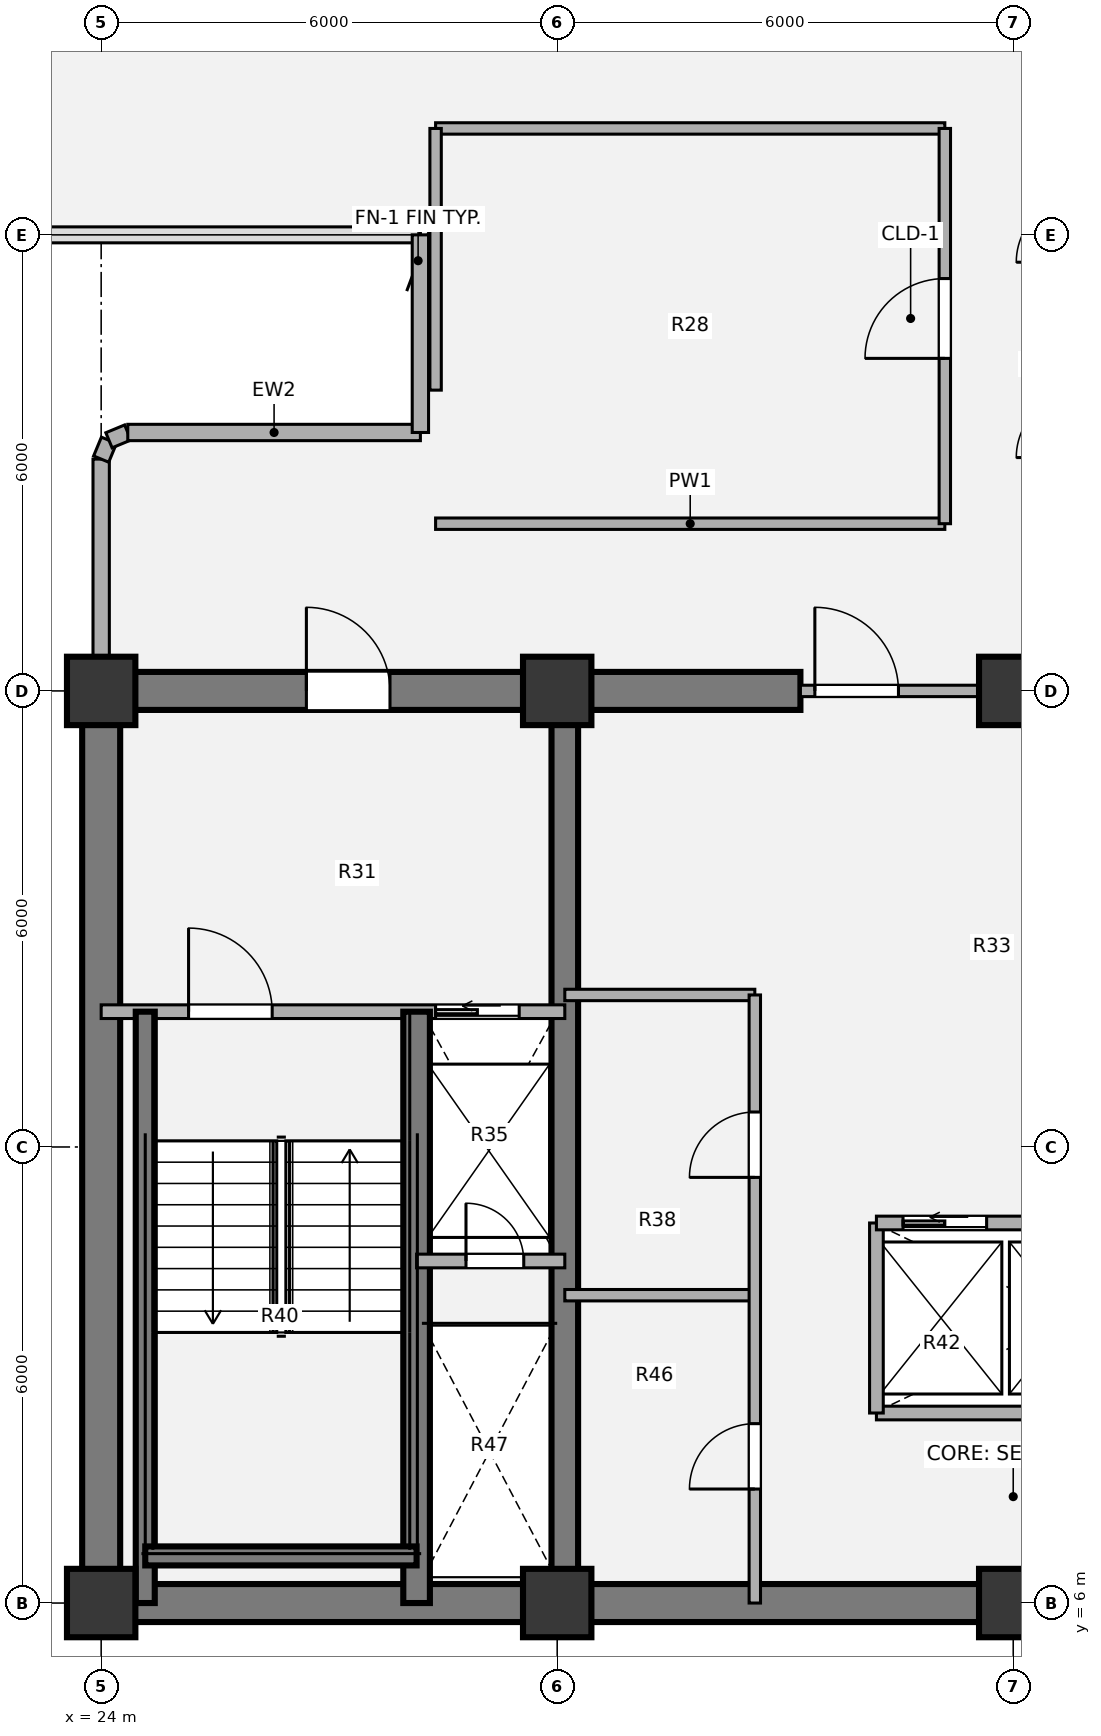
"""IFC4 building model, lengths in metres.
Left out: names, types, materials, properties, quantities, classifications, styles, units other than length and angle.
Written with IfcOpenShell. Run it as: python <this file> out.ifc"""

import sys

from ifc_helpers import new_model, si_unit, direction, frame, frame_2d, origin, origin_2d, place, context, subcontext, project, spatial, rectangle, extrude, source, transform, mapped, element, fill, save


model = new_model("IFC4")
c1 = context("Model", 3, precision=1e-05, world=origin(), true_north=direction((0.0, 1.0)))
c2 = subcontext(c1, "Body", "Model", "MODEL_VIEW")
j1 = project(units=[si_unit("LENGTHUNIT", "METRE"), si_unit("PLANEANGLEUNIT", "RADIAN")], contexts=[c1])
p1 = place(None, origin())
s1 = spatial("IfcSite", under=j1, at=p1, CompositionType="ELEMENT")
p2 = place(p1, origin())
s2 = spatial("IfcBuilding", under=s1, at=p2, CompositionType="ELEMENT")
p3 = place(p2, frame((0.0, 0.0, 135.18)))
s3 = spatial("IfcBuildingStorey", under=s2, at=p3, CompositionType="ELEMENT", Elevation=135.18)
m1 = source(origin(), c2, "Body", "SweptSolid", [
    extrude(rectangle(XDim=0.9, YDim=0.9, at=origin_2d()), origin(), (0.0, 0.0, 1.0), 3.78),
])
for number, where, z_axis, x_axis in (
    (1, (24.0, 6.0, 0.0), (0.0, 0.0, 1.0), (1.0, 0.0, 0.0)),
    (2, (30.0, 6.0, 0.0), (0.0, 0.0, 1.0), (1.0, 0.0, 0.0)),
    (3, (36.0, 6.0, 0.0), (0.0, 0.0, 1.0), (1.0, 0.0, 0.0)),
    (4, (24.0, 18.0, 0.0), (0.0, 0.0, 1.0), (1.0, 0.0, 0.0)),
    (5, (30.0, 18.0, 0.0), (0.0, 0.0, 1.0), (1.0, 0.0, 0.0)),
    (6, (36.0, 18.0, 0.0), (0.0, 0.0, 1.0), (1.0, 0.0, 0.0)),
):
    element("IfcColumn", number, at=place(p3, frame(where, z_axis=z_axis, x_axis=x_axis)), inside=s3, PredefinedType="COLUMN", context=c2, shape_type="MappedRepresentation", body=[
        mapped(m1, transform((0.0, 0.0, 0.0), x_axis=(1.0, 0.0, 0.0), y_axis=(0.0, 1.0, 0.0), z_axis=(0.0, 0.0, 1.0), scale=1.0)),
    ])
p4 = place(p3, frame((48.25, 6.0, 0.0), z_axis=(0.0, 0.0, 1.0), x_axis=(-1.0, 0.0, 0.0)))
e7 = element("IfcWall", 7, at=p4, inside=s3, PredefinedType="SHEAR", context=c2, shape_type="SweptSolid", body=[
    extrude(rectangle(XDim=24.5, YDim=0.5, at=frame_2d((12.25, 0.0))), origin(), (0.0, 0.0, 1.0), 3.78),
])
p5 = place(p3, frame((24.0, 6.0, 0.0), z_axis=(0.0, 0.0, 1.0), x_axis=(0.0, 1.0, 0.0)))
e8 = element("IfcWall", 8, at=p5, inside=s3, PredefinedType="SHEAR", context=c2, shape_type="SweptSolid", body=[
    extrude(rectangle(XDim=12.0, YDim=0.5, at=frame_2d((6.0, 0.0))), origin(), (0.0, 0.0, 1.0), 3.78),
])
p6 = place(p3, frame((23.75, 18.0, 0.0), z_axis=(0.0, 0.0, 1.0), x_axis=(1.0, 0.0, 0.0)))
e9 = element("IfcWall", 9, at=p6, inside=s3, PredefinedType="SHEAR", context=c2, shape_type="SweptSolid", body=[
    extrude(rectangle(XDim=9.45, YDim=0.5, at=frame_2d((4.725, 0.0))), origin(), (0.0, 0.0, 1.0), 3.78),
])
p7 = place(p6, frame((2.95, 0.0, 0.0)))
e10 = element("IfcOpeningElement", 10, at=p7, cuts=e9, PredefinedType="OPENING", context=c2, shape_type="SweptSolid", body=[
    extrude(rectangle(XDim=1.1, YDim=2.1, at=origin_2d()), frame((0.55, 0.26, 1.05), z_axis=(0.0, -1.0, 0.0), x_axis=(1.0, 0.0, 0.0)), (0.0, 0.0, 1.0), 0.52),
])
p8 = place(p3, frame((30.1, 6.0, 0.0), z_axis=(0.0, 0.0, 1.0), x_axis=(0.0, 1.0, 0.0)))
e11 = element("IfcWall", 11, at=p8, inside=s3, PredefinedType="SHEAR", context=c2, shape_type="SweptSolid", body=[
    extrude(rectangle(XDim=12.0, YDim=0.35, at=frame_2d((6.0, 0.0))), origin(), (0.0, 0.0, 1.0), 3.78),
])
p9 = place(p3, frame((24.0, 18.43, 0.0), z_axis=(0.0, 0.0, 1.0), x_axis=(0.0, 1.0, 0.0)))
e12 = element("IfcWall", 12, at=p9, inside=s3, PredefinedType="SOLIDWALL", context=c2, shape_type="SweptSolid", body=[
    extrude(rectangle(XDim=2.62, YDim=0.215, at=frame_2d((1.31, 0.0))), origin(), (0.0, 0.0, 1.0), 3.53),
])
p10 = place(p3, frame((24.0, 21.05, 0.0), z_axis=(0.0, 0.0, 1.0), x_axis=(0.382673670509, 0.923883575944, 0.0)))
e13 = element("IfcWall", 13, at=p10, inside=s3, PredefinedType="SOLIDWALL", context=c2, shape_type="SweptSolid", body=[
    extrude(rectangle(XDim=0.268, YDim=0.215, at=frame_2d((0.134, 0.0))), origin(), (0.0, 0.0, 1.0), 3.53),
])
p11 = place(p3, frame((24.103, 21.298, 0.0), z_axis=(0.0, 0.0, 1.0), x_axis=(0.924205486139, 0.381895560841, 0.0)))
e14 = element("IfcWall", 14, at=p11, inside=s3, PredefinedType="SOLIDWALL", context=c2, shape_type="SweptSolid", body=[
    extrude(rectangle(XDim=0.268, YDim=0.215, at=frame_2d((0.134, 0.0))), origin(), (0.0, 0.0, 1.0), 3.53),
])
p12 = place(p3, frame((24.35, 21.4, 0.0), z_axis=(0.0, 0.0, 1.0), x_axis=(1.0, 0.0, 0.0)))
e15 = element("IfcWall", 15, at=p12, inside=s3, PredefinedType="SOLIDWALL", context=c2, shape_type="SweptSolid", body=[
    extrude(rectangle(XDim=3.85, YDim=0.215, at=frame_2d((1.925, 0.0))), origin(), (0.0, 0.0, 1.0), 3.53),
])
p13 = place(p3, frame((28.2, 21.4, 0.0), z_axis=(0.0, 0.0, 1.0), x_axis=(0.0, 1.0, 0.0)))
e16 = element("IfcWall", 16, at=p13, inside=s3, PredefinedType="SOLIDWALL", context=c2, shape_type="SweptSolid", body=[
    extrude(rectangle(XDim=2.6, YDim=0.215, at=frame_2d((1.3, 0.0))), origin(), (0.0, 0.0, 1.0), 3.53),
])
p14 = place(p3, frame((30.1, 14.0, 0.0), z_axis=(0.0, 0.0, 1.0), x_axis=(1.0, 0.0, 0.0)))
e17 = element("IfcWall", 17, at=p14, inside=s3, PredefinedType="PARTITIONING", context=c2, shape_type="SweptSolid", body=[
    extrude(rectangle(XDim=2.5, YDim=0.15, at=frame_2d((1.25, 0.0))), origin(), (0.0, 0.0, 1.0), 3.5),
])
p15 = place(p3, frame((34.2, 8.5, 0.0), z_axis=(0.0, 0.0, 1.0), x_axis=(1.0, 0.0, 0.0)))
e18 = element("IfcWall", 18, at=p15, inside=s3, PredefinedType="PARTITIONING", context=c2, shape_type="SweptSolid", body=[
    extrude(rectangle(XDim=5.15, YDim=0.18, at=frame_2d((2.575, 0.0))), origin(), (0.0, 0.0, 1.0), 3.5),
])
p16 = place(p3, frame((34.2, 8.5, 0.0), z_axis=(0.0, 0.0, 1.0), x_axis=(0.0, 1.0, 0.0)))
e19 = element("IfcWall", 19, at=p16, inside=s3, PredefinedType="PARTITIONING", context=c2, shape_type="SweptSolid", body=[
    extrude(rectangle(XDim=2.5, YDim=0.18, at=frame_2d((1.25, 0.0))), origin(), (0.0, 0.0, 1.0), 3.5),
])
p17 = place(p3, frame((30.1, 10.05, 0.0), z_axis=(0.0, 0.0, 1.0), x_axis=(1.0, 0.0, 0.0)))
e20 = element("IfcWall", 20, at=p17, inside=s3, PredefinedType="PARTITIONING", context=c2, shape_type="SweptSolid", body=[
    extrude(rectangle(XDim=2.5, YDim=0.15, at=frame_2d((1.25, 0.0))), origin(), (0.0, 0.0, 1.0), 3.5),
])
p18 = place(p3, frame((32.6, 6.0, 0.0), z_axis=(0.0, 0.0, 1.0), x_axis=(0.0, 1.0, 0.0)))
e21 = element("IfcWall", 21, at=p18, inside=s3, PredefinedType="PARTITIONING", context=c2, shape_type="SweptSolid", body=[
    extrude(rectangle(XDim=8.0, YDim=0.15, at=frame_2d((4.0, 0.0))), origin(), (0.0, 0.0, 1.0), 3.5),
])
p19 = place(p18, frame((1.5, 0.0, 0.0)))
e22 = element("IfcOpeningElement", 22, at=p19, cuts=e21, PredefinedType="OPENING", context=c2, shape_type="SweptSolid", body=[
    extrude(rectangle(XDim=0.86, YDim=2.1, at=origin_2d()), frame((0.43, 0.085, 1.05), z_axis=(0.0, -1.0, 0.0), x_axis=(1.0, 0.0, 0.0)), (0.0, 0.0, 1.0), 0.17),
])
p20 = place(p18, frame((5.6, 0.0, 0.0)))
e23 = element("IfcOpeningElement", 23, at=p20, cuts=e21, PredefinedType="OPENING", context=c2, shape_type="SweptSolid", body=[
    extrude(rectangle(XDim=0.86, YDim=2.1, at=origin_2d()), frame((0.43, 0.085, 1.05), z_axis=(0.0, -1.0, 0.0), x_axis=(1.0, 0.0, 0.0)), (0.0, 0.0, 1.0), 0.17),
])
p21 = place(p3, frame((33.2, 18.0, 0.0), z_axis=(0.0, 0.0, 1.0), x_axis=(1.0, 0.0, 0.0)))
e24 = element("IfcWall", 24, at=p21, inside=s3, PredefinedType="PARTITIONING", context=c2, shape_type="SweptSolid", body=[
    extrude(rectangle(XDim=5.6, YDim=0.15, at=frame_2d((2.8, 0.0))), origin(), (0.0, 0.0, 1.0), 2.315),
])
p22 = place(p21, frame((0.19, 0.0, 0.0)))
e25 = element("IfcOpeningElement", 25, at=p22, cuts=e24, PredefinedType="OPENING", context=c2, shape_type="SweptSolid", body=[
    extrude(rectangle(XDim=1.1, YDim=2.1, at=origin_2d()), frame((0.55, 0.085, 1.05), z_axis=(0.0, -1.0, 0.0), x_axis=(1.0, 0.0, 0.0)), (0.0, 0.0, 1.0), 0.17),
])
p23 = place(p21, frame((4.31, 0.0, 0.0)))
e26 = element("IfcOpeningElement", 26, at=p23, cuts=e24, PredefinedType="OPENING", context=c2, shape_type="SweptSolid", body=[
    extrude(rectangle(XDim=1.1, YDim=2.1, at=origin_2d()), frame((0.55, 0.085, 1.05), z_axis=(0.0, -1.0, 0.0), x_axis=(1.0, 0.0, 0.0)), (0.0, 0.0, 1.0), 0.17),
])
p24 = place(p3, frame((24.0, 13.78, 0.0), z_axis=(0.0, 0.0, 1.0), x_axis=(1.0, 0.0, 0.0)))
e27 = element("IfcWall", 27, at=p24, inside=s3, PredefinedType="PARTITIONING", context=c2, shape_type="SweptSolid", body=[
    extrude(rectangle(XDim=6.1, YDim=0.18, at=frame_2d((3.05, 0.0))), origin(), (0.0, 0.0, 1.0), 3.5),
])
p25 = place(p24, frame((1.15, 0.0, 0.0)))
e28 = element("IfcOpeningElement", 28, at=p25, cuts=e27, PredefinedType="OPENING", context=c2, shape_type="SweptSolid", body=[
    extrude(rectangle(XDim=1.1, YDim=2.1, at=origin_2d()), frame((0.55, 0.1, 1.05), z_axis=(0.0, -1.0, 0.0), x_axis=(1.0, 0.0, 0.0)), (0.0, 0.0, 1.0), 0.2),
])
p26 = place(p24, frame((4.4, 0.0, 0.0)))
e29 = element("IfcOpeningElement", 29, at=p26, cuts=e27, PredefinedType="OPENING", context=c2, shape_type="SweptSolid", body=[
    extrude(rectangle(XDim=1.1, YDim=2.1, at=origin_2d()), frame((0.55, 0.1, 1.05), z_axis=(0.0, -1.0, 0.0), x_axis=(1.0, 0.0, 0.0)), (0.0, 0.0, 1.0), 0.2),
])
p27 = place(p3, frame((28.15, 6.0, 0.0), z_axis=(0.0, 0.0, 1.0), x_axis=(0.0, 1.0, 0.0)))
e30 = element("IfcWall", 30, at=p27, inside=s3, PredefinedType="SHEAR", context=c2, shape_type="SweptSolid", body=[
    extrude(rectangle(XDim=7.78, YDim=0.35, at=frame_2d((3.89, 0.0))), origin(), (0.0, 0.0, 1.0), 3.85),
])
p28 = place(p3, frame((24.58, 6.0, 0.0), z_axis=(0.0, 0.0, 1.0), x_axis=(0.0, 1.0, 0.0)))
e31 = element("IfcWall", 31, at=p28, inside=s3, PredefinedType="SHEAR", context=c2, shape_type="SweptSolid", body=[
    extrude(rectangle(XDim=7.78, YDim=0.25, at=frame_2d((3.89, 0.0))), origin(), (0.0, 0.0, 1.0), 3.85),
])
p29 = place(p3, frame((24.58, 6.62, 0.0), z_axis=(0.0, 0.0, 1.0), x_axis=(1.0, 0.0, 0.0)))
e32 = element("IfcWall", 32, at=p29, inside=s3, PredefinedType="SHEAR", context=c2, shape_type="SweptSolid", body=[
    extrude(rectangle(XDim=3.57, YDim=0.25, at=frame_2d((1.785, 0.0))), origin(), (0.0, 0.0, 1.0), 3.85),
])
p30 = place(p3, frame((28.15, 10.5, 0.0), z_axis=(0.0, 0.0, 1.0), x_axis=(1.0, 0.0, 0.0)))
e33 = element("IfcWall", 33, at=p30, inside=s3, PredefinedType="PARTITIONING", context=c2, shape_type="SweptSolid", body=[
    extrude(rectangle(XDim=1.95, YDim=0.18, at=frame_2d((0.975, 0.0))), origin(), (0.0, 0.0, 1.0), 3.5),
])
p31 = place(p30, frame((0.65, 0.0, 0.0)))
e34 = element("IfcOpeningElement", 34, at=p31, cuts=e33, PredefinedType="OPENING", context=c2, shape_type="SweptSolid", body=[
    extrude(rectangle(XDim=0.76, YDim=2.05, at=origin_2d()), frame((0.38, 0.1, 1.025), z_axis=(0.0, -1.0, 0.0), x_axis=(1.0, 0.0, 0.0)), (0.0, 0.0, 1.0), 0.2),
])
p32 = place(p3, frame((34.2, 11.0, 0.0), z_axis=(0.0, 0.0, 1.0), x_axis=(1.0, 0.0, 0.0)))
e35 = element("IfcWall", 35, at=p32, inside=s3, PredefinedType="PARTITIONING", context=c2, shape_type="SweptSolid", body=[
    extrude(rectangle(XDim=5.15, YDim=0.18, at=frame_2d((2.575, 0.0))), origin(), (0.0, 0.0, 1.0), 3.5),
])
p33 = place(p32, frame((0.35, 0.0, 0.0)))
e36 = element("IfcOpeningElement", 36, at=p33, cuts=e35, PredefinedType="OPENING", context=c2, shape_type="SweptSolid", body=[
    extrude(rectangle(XDim=1.1, YDim=2.1, at=origin_2d()), frame((0.55, 0.1, 1.05), z_axis=(0.0, -1.0, 0.0), x_axis=(1.0, 0.0, 0.0)), (0.0, 0.0, 1.0), 0.2),
])
p34 = place(p32, frame((2.05, 0.0, 0.0)))
e37 = element("IfcOpeningElement", 37, at=p34, cuts=e35, PredefinedType="OPENING", context=c2, shape_type="SweptSolid", body=[
    extrude(rectangle(XDim=1.1, YDim=2.1, at=origin_2d()), frame((0.55, 0.1, 1.05), z_axis=(0.0, -1.0, 0.0), x_axis=(1.0, 0.0, 0.0)), (0.0, 0.0, 1.0), 0.2),
])
p35 = place(p32, frame((3.7, 0.0, 0.0)))
e38 = element("IfcOpeningElement", 38, at=p35, cuts=e35, PredefinedType="OPENING", context=c2, shape_type="SweptSolid", body=[
    extrude(rectangle(XDim=1.1, YDim=2.1, at=origin_2d()), frame((0.55, 0.1, 1.05), z_axis=(0.0, -1.0, 0.0), x_axis=(1.0, 0.0, 0.0)), (0.0, 0.0, 1.0), 0.2),
])
for number, where, z_axis, x_axis in (
    (39, (28.4, 20.2, 0.0), (0.0, 0.0, 1.0), (1.0, 0.0, 0.0)),
    (40, (28.4, 25.4, 0.0), (0.0, 0.0, 1.0), (1.0, 0.0, 0.0)),
):
    element("IfcWall", number, at=place(p3, frame(where, z_axis=z_axis, x_axis=x_axis)), inside=s3, PredefinedType="PARTITIONING", context=c2, shape_type="SweptSolid", body=[
        extrude(rectangle(XDim=6.7, YDim=0.15, at=frame_2d((3.35, 0.0))), origin(), (0.0, 0.0, 1.0), 3.5),
    ])
p36 = place(p3, frame((28.4, 21.957, 0.0), z_axis=(0.0, 0.0, 1.0), x_axis=(0.0, 1.0, 0.0)))
e41 = element("IfcWall", 41, at=p36, inside=s3, PredefinedType="PARTITIONING", context=c2, shape_type="SweptSolid", body=[
    extrude(rectangle(XDim=3.443, YDim=0.15, at=frame_2d((1.721, 0.0))), origin(), (0.0, 0.0, 1.0), 3.5),
])
p37 = place(p3, frame((35.1, 20.2, 0.0), z_axis=(0.0, 0.0, 1.0), x_axis=(0.0, 1.0, 0.0)))
e42 = element("IfcWall", 42, at=p37, inside=s3, PredefinedType="PARTITIONING", context=c2, shape_type="SweptSolid", body=[
    extrude(rectangle(XDim=5.2, YDim=0.15, at=frame_2d((2.6, 0.0))), origin(), (0.0, 0.0, 1.0), 3.5),
])
p38 = place(p37, frame((2.175, 0.0, 0.0)))
e43 = element("IfcOpeningElement", 43, at=p38, cuts=e42, PredefinedType="OPENING", context=c2, shape_type="SweptSolid", body=[
    extrude(rectangle(XDim=1.05, YDim=2.1, at=origin_2d()), frame((0.525, 0.085, 1.05), z_axis=(0.0, -1.0, 0.0), x_axis=(1.0, 0.0, 0.0)), (0.0, 0.0, 1.0), 0.17),
])
m2 = source(origin(), c2, "Body", "SweptSolid", [
    extrude(rectangle(XDim=0.86, YDim=2.1, at=origin_2d()), frame((0.43, 0.025, 1.05), z_axis=(0.0, -1.0, 0.0), x_axis=(1.0, 0.0, 0.0)), (0.0, 0.0, 1.0), 0.05),
])
p39 = place(p19, origin())
e44 = element("IfcDoor", 44, at=p39, inside=s3, OperationType="SINGLE_SWING_LEFT", PredefinedType="DOOR", context=c2, shape_type="MappedRepresentation", body=[
    mapped(m2, transform((0.0, 0.0, 0.0), x_axis=(1.0, 0.0, 0.0), y_axis=(0.0, 1.0, 0.0), z_axis=(0.0, 0.0, 1.0), scale=1.0)),
])
fill(e22, e44)
p40 = place(p20, origin())
e45 = element("IfcDoor", 45, at=p40, inside=s3, OperationType="SINGLE_SWING_LEFT", PredefinedType="DOOR", context=c2, shape_type="MappedRepresentation", body=[
    mapped(m2, transform((0.0, 0.0, 0.0), x_axis=(1.0, 0.0, 0.0), y_axis=(0.0, 1.0, 0.0), z_axis=(0.0, 0.0, 1.0), scale=1.0)),
])
fill(e23, e45)
m3 = source(origin(), c2, "Body", "SweptSolid", [
    extrude(rectangle(XDim=1.1, YDim=2.1, at=origin_2d()), frame((0.55, 0.025, 1.05), z_axis=(0.0, -1.0, 0.0), x_axis=(1.0, 0.0, 0.0)), (0.0, 0.0, 1.0), 0.05),
])
p41 = place(p22, origin())
e46 = element("IfcDoor", 46, at=p41, inside=s3, OperationType="SINGLE_SWING_LEFT", PredefinedType="DOOR", context=c2, shape_type="MappedRepresentation", body=[
    mapped(m3, transform((0.0, 0.0, 0.0), x_axis=(1.0, 0.0, 0.0), y_axis=(0.0, 1.0, 0.0), z_axis=(0.0, 0.0, 1.0), scale=1.0)),
])
fill(e25, e46)
m4 = source(origin(), c2, "Body", "SweptSolid", [
    extrude(rectangle(XDim=1.1, YDim=2.1, at=origin_2d()), frame((0.55, 0.025, 1.05), z_axis=(0.0, -1.0, 0.0), x_axis=(1.0, 0.0, 0.0)), (0.0, 0.0, 1.0), 0.05),
])
p42 = place(p25, origin())
e47 = element("IfcDoor", 47, at=p42, inside=s3, OperationType="SINGLE_SWING_LEFT", PredefinedType="DOOR", context=c2, shape_type="MappedRepresentation", body=[
    mapped(m4, transform((0.0, 0.0, 0.0), x_axis=(1.0, 0.0, 0.0), y_axis=(0.0, 1.0, 0.0), z_axis=(0.0, 0.0, 1.0), scale=1.0)),
])
fill(e28, e47)
m5 = source(origin(), c2, "Body", "SweptSolid", [
    extrude(rectangle(XDim=1.1, YDim=2.1, at=origin_2d()), frame((0.55, 0.025, 1.05), z_axis=(0.0, -1.0, 0.0), x_axis=(1.0, 0.0, 0.0)), (0.0, 0.0, 1.0), 0.05),
])
p43 = place(p26, origin())
e48 = element("IfcDoor", 48, at=p43, inside=s3, OperationType="SLIDING_TO_LEFT", PredefinedType="DOOR", context=c2, shape_type="MappedRepresentation", body=[
    mapped(m5, transform((0.0, 0.0, 0.0), x_axis=(1.0, 0.0, 0.0), y_axis=(0.0, 1.0, 0.0), z_axis=(0.0, 0.0, 1.0), scale=1.0)),
])
fill(e29, e48)
m6 = source(origin(), c2, "Body", "SweptSolid", [
    extrude(rectangle(XDim=0.76, YDim=2.05, at=origin_2d()), frame((0.38, 0.025, 1.025), z_axis=(0.0, -1.0, 0.0), x_axis=(1.0, 0.0, 0.0)), (0.0, 0.0, 1.0), 0.05),
])
p44 = place(p31, origin())
e49 = element("IfcDoor", 49, at=p44, inside=s3, OperationType="SINGLE_SWING_LEFT", PredefinedType="DOOR", context=c2, shape_type="MappedRepresentation", body=[
    mapped(m6, transform((0.0, 0.0, 0.0), x_axis=(1.0, 0.0, 0.0), y_axis=(0.0, 1.0, 0.0), z_axis=(0.0, 0.0, 1.0), scale=1.0)),
])
fill(e34, e49)
p45 = place(p7, origin())
e50 = element("IfcDoor", 50, at=p45, inside=s3, OperationType="SINGLE_SWING_LEFT", PredefinedType="DOOR", context=c2, shape_type="MappedRepresentation", body=[
    mapped(m3, transform((0.0, 0.0, 0.0), x_axis=(1.0, 0.0, 0.0), y_axis=(0.0, 1.0, 0.0), z_axis=(0.0, 0.0, 1.0), scale=1.0)),
])
fill(e10, e50)
p46 = place(p33, origin())
e51 = element("IfcDoor", 51, at=p46, inside=s3, OperationType="SLIDING_TO_LEFT", PredefinedType="DOOR", context=c2, shape_type="MappedRepresentation", body=[
    mapped(m5, transform((0.0, 0.0, 0.0), x_axis=(1.0, 0.0, 0.0), y_axis=(0.0, 1.0, 0.0), z_axis=(0.0, 0.0, 1.0), scale=1.0)),
])
fill(e36, e51)
m7 = source(origin(), c2, "Body", "SweptSolid", [
    extrude(rectangle(XDim=1.05, YDim=2.1, at=origin_2d()), frame((0.525, 0.025, 1.05), z_axis=(0.0, -1.0, 0.0), x_axis=(1.0, 0.0, 0.0)), (0.0, 0.0, 1.0), 0.05),
])
p47 = place(p38, origin())
e52 = element("IfcDoor", 52, at=p47, inside=s3, OperationType="SINGLE_SWING_LEFT", PredefinedType="DOOR", context=c2, shape_type="MappedRepresentation", body=[
    mapped(m7, transform((0.0, 0.0, 0.0), x_axis=(1.0, 0.0, 0.0), y_axis=(0.0, 1.0, 0.0), z_axis=(0.0, 0.0, 1.0), scale=1.0)),
])
fill(e43, e52)
save(model, sys.argv[1])
